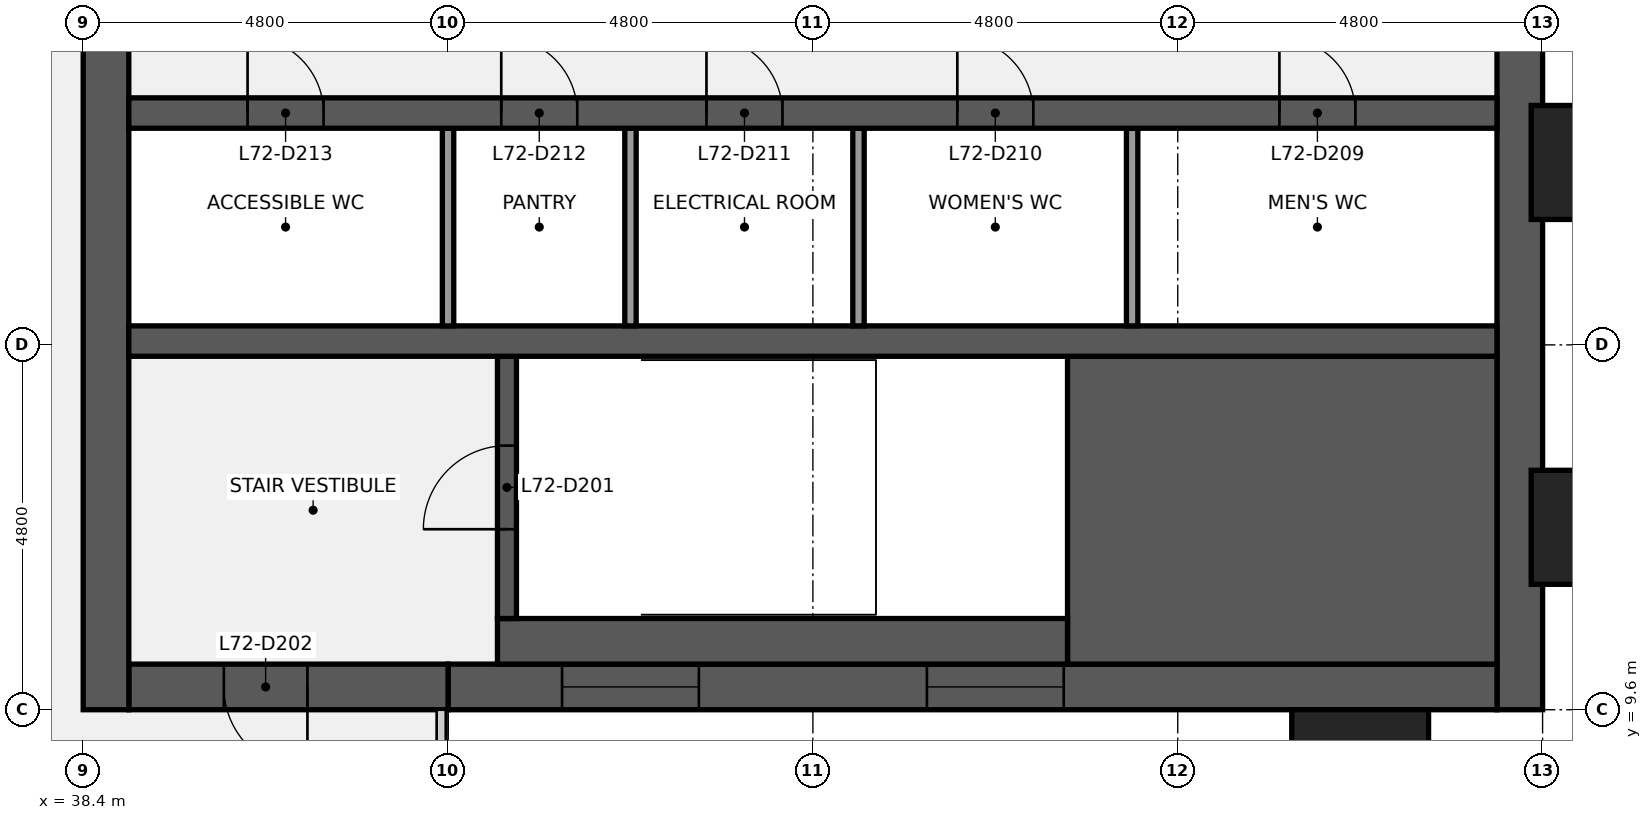
"""IFC4 building model, lengths in metres.
Left out: names, types, materials, properties, quantities, classifications, styles, units other than length and angle.
Written with IfcOpenShell. Run it as: python <this file> out.ifc"""

import sys

from ifc_helpers import new_model, si_unit, direction, frame, frame_2d, origin, origin_2d, place, context, subcontext, project, spatial, rectangle, extrude, element, fill, save


model = new_model("IFC4")
c1 = context("Model", 3, precision=1e-05, world=origin(), true_north=direction((0.0, 1.0)))
c2 = subcontext(c1, "Body", "Model", "MODEL_VIEW")
j1 = project(units=[si_unit("LENGTHUNIT", "METRE"), si_unit("PLANEANGLEUNIT", "RADIAN")], contexts=[c1])
p1 = place(None, origin())
s1 = spatial("IfcSite", under=j1, at=p1, CompositionType="ELEMENT")
p2 = place(p1, origin())
s2 = spatial("IfcBuilding", under=s1, at=p2, CompositionType="ELEMENT")
p3 = place(p2, frame((0.0, 0.0, 326.3)))
s3 = spatial("IfcBuildingStorey", under=s2, at=p3, CompositionType="ELEMENT", Elevation=326.3)
p4 = place(p3, frame((57.3, 38.4, 0.0), z_axis=(0.0, 0.0, 1.0), x_axis=(0.0, -1.0, 0.0)))
e1 = element("IfcWall", 1, at=p4, inside=s3, PredefinedType="SHEAR", context=c2, shape_type="SweptSolid", body=[
    extrude(rectangle(XDim=28.8, YDim=0.6, at=frame_2d((14.4, 0.0))), origin(), (0.0, 0.0, 1.0), 3.84),
])
p5 = place(p4, frame((18.45, 0.0, 0.9)))
e2 = element("IfcOpeningElement", 2, at=p5, cuts=e1, PredefinedType="OPENING", context=c2, shape_type="SweptSolid", body=[
    extrude(rectangle(XDim=1.5, YDim=1.5, at=frame_2d((0.75, 0.75))), frame((0.0, 0.31, 0.0), z_axis=(0.0, -1.0, 0.0), x_axis=(1.0, 0.0, 0.0)), (0.0, 0.0, 1.0), 0.62),
])
p6 = place(p4, frame((8.85, 0.0, 0.9)))
e3 = element("IfcOpeningElement", 3, at=p6, cuts=e1, PredefinedType="OPENING", context=c2, shape_type="SweptSolid", body=[
    extrude(rectangle(XDim=1.5, YDim=1.5, at=frame_2d((0.75, 0.75))), frame((0.0, 0.31, 0.0), z_axis=(0.0, -1.0, 0.0), x_axis=(1.0, 0.0, 0.0)), (0.0, 0.0, 1.0), 0.62),
])
p7 = place(p3, frame((57.0, 9.9, 0.0), z_axis=(0.0, 0.0, 1.0), x_axis=(-1.0, 0.0, 0.0)))
e4 = element("IfcWall", 4, at=p7, inside=s3, PredefinedType="SHEAR", context=c2, shape_type="SweptSolid", body=[
    extrude(rectangle(XDim=13.8, YDim=0.6, at=frame_2d((6.9, 0.0))), origin(), (0.0, 0.0, 1.0), 3.84),
])
p8 = place(p7, frame((5.7, 0.0, 0.9)))
e5 = element("IfcOpeningElement", 5, at=p8, cuts=e4, PredefinedType="OPENING", context=c2, shape_type="SweptSolid", body=[
    extrude(rectangle(XDim=1.8, YDim=1.5, at=frame_2d((0.9, 0.75))), frame((0.0, 0.31, 0.0), z_axis=(0.0, -1.0, 0.0), x_axis=(1.0, 0.0, 0.0)), (0.0, 0.0, 1.0), 0.62),
])
p9 = place(p7, frame((10.5, 0.0, 0.9)))
e6 = element("IfcOpeningElement", 6, at=p9, cuts=e4, PredefinedType="OPENING", context=c2, shape_type="SweptSolid", body=[
    extrude(rectangle(XDim=1.8, YDim=1.5, at=frame_2d((0.9, 0.75))), frame((0.0, 0.31, 0.0), z_axis=(0.0, -1.0, 0.0), x_axis=(1.0, 0.0, 0.0)), (0.0, 0.0, 1.0), 0.62),
])
p10 = place(p3, frame((43.2, 9.9, 0.0), z_axis=(0.0, 0.0, 1.0), x_axis=(-1.0, 0.0, 0.0)))
e7 = element("IfcWall", 7, at=p10, inside=s3, PredefinedType="SHEAR", context=c2, shape_type="SweptSolid", body=[
    extrude(rectangle(XDim=4.2, YDim=0.6, at=frame_2d((2.1, 0.0))), origin(), (0.0, 0.0, 1.0), 3.84),
])
p11 = place(p10, frame((1.85, 0.0, 0.0)))
e8 = element("IfcOpeningElement", 8, at=p11, cuts=e7, PredefinedType="OPENING", context=c2, shape_type="SweptSolid", body=[
    extrude(rectangle(XDim=1.1, YDim=2.1, at=frame_2d((0.55, 1.05))), frame((0.0, 0.31, 0.0), z_axis=(0.0, -1.0, 0.0), x_axis=(1.0, 0.0, 0.0)), (0.0, 0.0, 1.0), 0.62),
])
p12 = place(p3, frame((38.7, 9.6, 0.0), z_axis=(0.0, 0.0, 1.0), x_axis=(0.0, 1.0, 0.0)))
e9 = element("IfcWall", 9, at=p12, inside=s3, PredefinedType="SHEAR", context=c2, shape_type="SweptSolid", body=[
    extrude(rectangle(XDim=28.8, YDim=0.6, at=frame_2d((14.4, 0.0))), origin(), (0.0, 0.0, 1.0), 3.84),
])
p13 = place(p12, frame((8.7, 0.0, 0.0)))
e10 = element("IfcOpeningElement", 10, at=p13, cuts=e9, PredefinedType="OPENING", context=c2, shape_type="SweptSolid", body=[
    extrude(rectangle(XDim=1.8, YDim=2.1, at=frame_2d((0.9, 1.05))), frame((0.0, 0.31, 0.0), z_axis=(0.0, -1.0, 0.0), x_axis=(1.0, 0.0, 0.0)), (0.0, 0.0, 1.0), 0.62),
])
p14 = place(p12, frame((18.3, 0.0, 0.0)))
e11 = element("IfcOpeningElement", 11, at=p14, cuts=e9, PredefinedType="OPENING", context=c2, shape_type="SweptSolid", body=[
    extrude(rectangle(XDim=1.8, YDim=2.1, at=frame_2d((0.9, 1.05))), frame((0.0, 0.31, 0.0), z_axis=(0.0, -1.0, 0.0), x_axis=(1.0, 0.0, 0.0)), (0.0, 0.0, 1.0), 0.62),
])
p15 = place(p3, frame((51.35, 12.225, 0.0), z_axis=(0.0, 0.0, 1.0), x_axis=(1.0, 0.0, 0.0)))
e12 = element("IfcWall", 12, at=p15, inside=s3, PredefinedType="SHEAR", context=c2, shape_type="SweptSolid", body=[
    extrude(rectangle(XDim=5.65, YDim=4.05, at=frame_2d((2.825, 0.0))), origin(), (0.0, 0.0, 1.0), 3.84),
])
p16 = place(p3, frame((43.85, 10.5, 0.0), z_axis=(0.0, 0.0, 1.0), x_axis=(1.0, 0.0, 0.0)))
e13 = element("IfcWall", 13, at=p16, inside=s3, PredefinedType="SHEAR", context=c2, shape_type="SweptSolid", body=[
    extrude(rectangle(XDim=7.5, YDim=0.6, at=frame_2d((3.75, 0.0))), origin(), (0.0, 0.0, 1.0), 3.84),
])
p17 = place(p3, frame((43.975, 10.8, 0.0), z_axis=(0.0, 0.0, 1.0), x_axis=(0.0, 1.0, 0.0)))
e14 = element("IfcWall", 14, at=p17, inside=s3, PredefinedType="SHEAR", context=c2, shape_type="SweptSolid", body=[
    extrude(rectangle(XDim=3.45, YDim=0.25, at=frame_2d((1.725, 0.0))), origin(), (0.0, 0.0, 1.0), 3.84),
])
p18 = place(p17, frame((1.175, 0.0, 0.0)))
e15 = element("IfcOpeningElement", 15, at=p18, cuts=e14, PredefinedType="OPENING", context=c2, shape_type="SweptSolid", body=[
    extrude(rectangle(XDim=1.1, YDim=2.1, at=frame_2d((0.55, 1.05))), frame((0.0, 0.135, 0.0), z_axis=(0.0, -1.0, 0.0), x_axis=(1.0, 0.0, 0.0)), (0.0, 0.0, 1.0), 0.27),
])
p19 = place(p3, frame((39.0, 14.45, 0.0), z_axis=(0.0, 0.0, 1.0), x_axis=(1.0, 0.0, 0.0)))
e16 = element("IfcWall", 16, at=p19, inside=s3, PredefinedType="SHEAR", context=c2, shape_type="SweptSolid", body=[
    extrude(rectangle(XDim=18.0, YDim=0.4, at=frame_2d((9.0, 0.0))), origin(), (0.0, 0.0, 1.0), 3.84),
])
for number, where, z_axis, x_axis in (
    (17, (52.2, 14.65, 0.0), (0.0, 0.0, 1.0), (0.0, 1.0, 0.0)),
    (18, (48.6, 14.65, 0.0), (0.0, 0.0, 1.0), (0.0, 1.0, 0.0)),
    (19, (45.6, 14.65, 0.0), (0.0, 0.0, 1.0), (0.0, 1.0, 0.0)),
    (20, (43.2, 14.65, 0.0), (0.0, 0.0, 1.0), (0.0, 1.0, 0.0)),
):
    element("IfcWall", number, at=place(p3, frame(where, z_axis=z_axis, x_axis=x_axis)), inside=s3, PredefinedType="PARTITIONING", context=c2, shape_type="SweptSolid", body=[
        extrude(rectangle(XDim=2.6, YDim=0.15, at=frame_2d((1.3, 0.0))), origin(), (0.0, 0.0, 1.0), 3.84),
    ])
p20 = place(p3, frame((39.0, 17.45, 0.0), z_axis=(0.0, 0.0, 1.0), x_axis=(1.0, 0.0, 0.0)))
e21 = element("IfcWall", 21, at=p20, inside=s3, PredefinedType="SHEAR", context=c2, shape_type="SweptSolid", body=[
    extrude(rectangle(XDim=18.0, YDim=0.4, at=frame_2d((9.0, 0.0))), origin(), (0.0, 0.0, 1.0), 3.84),
])
p21 = place(p20, frame((15.137, 0.0, 0.0)))
e22 = element("IfcOpeningElement", 22, at=p21, cuts=e21, PredefinedType="OPENING", context=c2, shape_type="SweptSolid", body=[
    extrude(rectangle(XDim=1.0, YDim=2.1, at=frame_2d((0.5, 1.05))), frame((0.0, 0.21, 0.0), z_axis=(0.0, -1.0, 0.0), x_axis=(1.0, 0.0, 0.0)), (0.0, 0.0, 1.0), 0.42),
])
p22 = place(p20, frame((10.9, 0.0, 0.0)))
e23 = element("IfcOpeningElement", 23, at=p22, cuts=e21, PredefinedType="OPENING", context=c2, shape_type="SweptSolid", body=[
    extrude(rectangle(XDim=1.0, YDim=2.1, at=frame_2d((0.5, 1.05))), frame((0.0, 0.21, 0.0), z_axis=(0.0, -1.0, 0.0), x_axis=(1.0, 0.0, 0.0)), (0.0, 0.0, 1.0), 0.42),
])
p23 = place(p20, frame((7.6, 0.0, 0.0)))
e24 = element("IfcOpeningElement", 24, at=p23, cuts=e21, PredefinedType="OPENING", context=c2, shape_type="SweptSolid", body=[
    extrude(rectangle(XDim=1.0, YDim=2.1, at=frame_2d((0.5, 1.05))), frame((0.0, 0.21, 0.0), z_axis=(0.0, -1.0, 0.0), x_axis=(1.0, 0.0, 0.0)), (0.0, 0.0, 1.0), 0.42),
])
p24 = place(p20, frame((4.9, 0.0, 0.0)))
e25 = element("IfcOpeningElement", 25, at=p24, cuts=e21, PredefinedType="OPENING", context=c2, shape_type="SweptSolid", body=[
    extrude(rectangle(XDim=1.0, YDim=2.1, at=frame_2d((0.5, 1.05))), frame((0.0, 0.21, 0.0), z_axis=(0.0, -1.0, 0.0), x_axis=(1.0, 0.0, 0.0)), (0.0, 0.0, 1.0), 0.42),
])
p25 = place(p20, frame((1.562, 0.0, 0.0)))
e26 = element("IfcOpeningElement", 26, at=p25, cuts=e21, PredefinedType="OPENING", context=c2, shape_type="SweptSolid", body=[
    extrude(rectangle(XDim=1.0, YDim=2.1, at=frame_2d((0.5, 1.05))), frame((0.0, 0.21, 0.0), z_axis=(0.0, -1.0, 0.0), x_axis=(1.0, 0.0, 0.0)), (0.0, 0.0, 1.0), 0.42),
])
for number, where, z_axis, x_axis in (
    (27, (55.2, 8.85, 0.0), (0.0, 0.0, 1.0), (1.0, 0.0, 0.0)),
    (28, (58.35, 12.0, 0.0), (0.0, 0.0, 1.0), (0.0, 1.0, 0.0)),
    (29, (58.35, 16.8, 0.0), (0.0, 0.0, 1.0), (0.0, 1.0, 0.0)),
):
    element("IfcColumn", number, at=place(p3, frame(where, z_axis=z_axis, x_axis=x_axis)), inside=s3, PredefinedType="PILASTER", context=c2, shape_type="SweptSolid", body=[
        extrude(rectangle(XDim=1.8, YDim=1.5, at=origin_2d()), origin(), (0.0, 0.0, 1.0), 4.0),
    ])
p26 = place(p18, origin())
e30 = element("IfcDoor", 30, at=p26, inside=s3, OperationType="SINGLE_SWING_LEFT", PredefinedType="DOOR", context=c2, shape_type="SweptSolid", body=[
    extrude(rectangle(XDim=1.1, YDim=2.1, at=frame_2d((0.55, 1.05))), frame((0.0, 0.025, 0.0), z_axis=(0.0, -1.0, 0.0), x_axis=(1.0, 0.0, 0.0)), (0.0, 0.0, 1.0), 0.05),
])
fill(e15, e30)
p27 = place(p11, origin())
e31 = element("IfcDoor", 31, at=p27, inside=s3, OperationType="SINGLE_SWING_LEFT", PredefinedType="DOOR", context=c2, shape_type="SweptSolid", body=[
    extrude(rectangle(XDim=1.1, YDim=2.1, at=frame_2d((0.55, 1.05))), frame((0.0, 0.025, 0.0), z_axis=(0.0, -1.0, 0.0), x_axis=(1.0, 0.0, 0.0)), (0.0, 0.0, 1.0), 0.05),
])
fill(e8, e31)
p28 = place(p21, origin())
e32 = element("IfcDoor", 32, at=p28, inside=s3, OperationType="SINGLE_SWING_LEFT", PredefinedType="DOOR", context=c2, shape_type="SweptSolid", body=[
    extrude(rectangle(XDim=1.0, YDim=2.1, at=frame_2d((0.5, 1.05))), frame((0.0, 0.025, 0.0), z_axis=(0.0, -1.0, 0.0), x_axis=(1.0, 0.0, 0.0)), (0.0, 0.0, 1.0), 0.05),
])
fill(e22, e32)
p29 = place(p22, origin())
e33 = element("IfcDoor", 33, at=p29, inside=s3, OperationType="SINGLE_SWING_LEFT", PredefinedType="DOOR", context=c2, shape_type="SweptSolid", body=[
    extrude(rectangle(XDim=1.0, YDim=2.1, at=frame_2d((0.5, 1.05))), frame((0.0, 0.025, 0.0), z_axis=(0.0, -1.0, 0.0), x_axis=(1.0, 0.0, 0.0)), (0.0, 0.0, 1.0), 0.05),
])
fill(e23, e33)
p30 = place(p23, origin())
e34 = element("IfcDoor", 34, at=p30, inside=s3, OperationType="SINGLE_SWING_LEFT", PredefinedType="DOOR", context=c2, shape_type="SweptSolid", body=[
    extrude(rectangle(XDim=1.0, YDim=2.1, at=frame_2d((0.5, 1.05))), frame((0.0, 0.025, 0.0), z_axis=(0.0, -1.0, 0.0), x_axis=(1.0, 0.0, 0.0)), (0.0, 0.0, 1.0), 0.05),
])
fill(e24, e34)
p31 = place(p24, origin())
e35 = element("IfcDoor", 35, at=p31, inside=s3, OperationType="SINGLE_SWING_LEFT", PredefinedType="DOOR", context=c2, shape_type="SweptSolid", body=[
    extrude(rectangle(XDim=1.0, YDim=2.1, at=frame_2d((0.5, 1.05))), frame((0.0, 0.025, 0.0), z_axis=(0.0, -1.0, 0.0), x_axis=(1.0, 0.0, 0.0)), (0.0, 0.0, 1.0), 0.05),
])
fill(e25, e35)
p32 = place(p25, origin())
e36 = element("IfcDoor", 36, at=p32, inside=s3, OperationType="SINGLE_SWING_LEFT", PredefinedType="DOOR", context=c2, shape_type="SweptSolid", body=[
    extrude(rectangle(XDim=1.0, YDim=2.1, at=frame_2d((0.5, 1.05))), frame((0.0, 0.025, 0.0), z_axis=(0.0, -1.0, 0.0), x_axis=(1.0, 0.0, 0.0)), (0.0, 0.0, 1.0), 0.05),
])
fill(e26, e36)
p33 = place(p8, origin())
e37 = element("IfcWindow", 37, at=p33, inside=s3, PartitioningType="SINGLE_PANEL", PredefinedType="WINDOW", context=c2, shape_type="SweptSolid", body=[
    extrude(rectangle(XDim=1.8, YDim=1.5, at=frame_2d((0.9, 0.75))), frame((0.0, 0.03, 0.0), z_axis=(0.0, -1.0, 0.0), x_axis=(1.0, 0.0, 0.0)), (0.0, 0.0, 1.0), 0.06),
])
fill(e5, e37)
p34 = place(p9, origin())
e38 = element("IfcWindow", 38, at=p34, inside=s3, PartitioningType="SINGLE_PANEL", PredefinedType="WINDOW", context=c2, shape_type="SweptSolid", body=[
    extrude(rectangle(XDim=1.8, YDim=1.5, at=frame_2d((0.9, 0.75))), frame((0.0, 0.03, 0.0), z_axis=(0.0, -1.0, 0.0), x_axis=(1.0, 0.0, 0.0)), (0.0, 0.0, 1.0), 0.06),
])
fill(e6, e38)
save(model, sys.argv[1])
